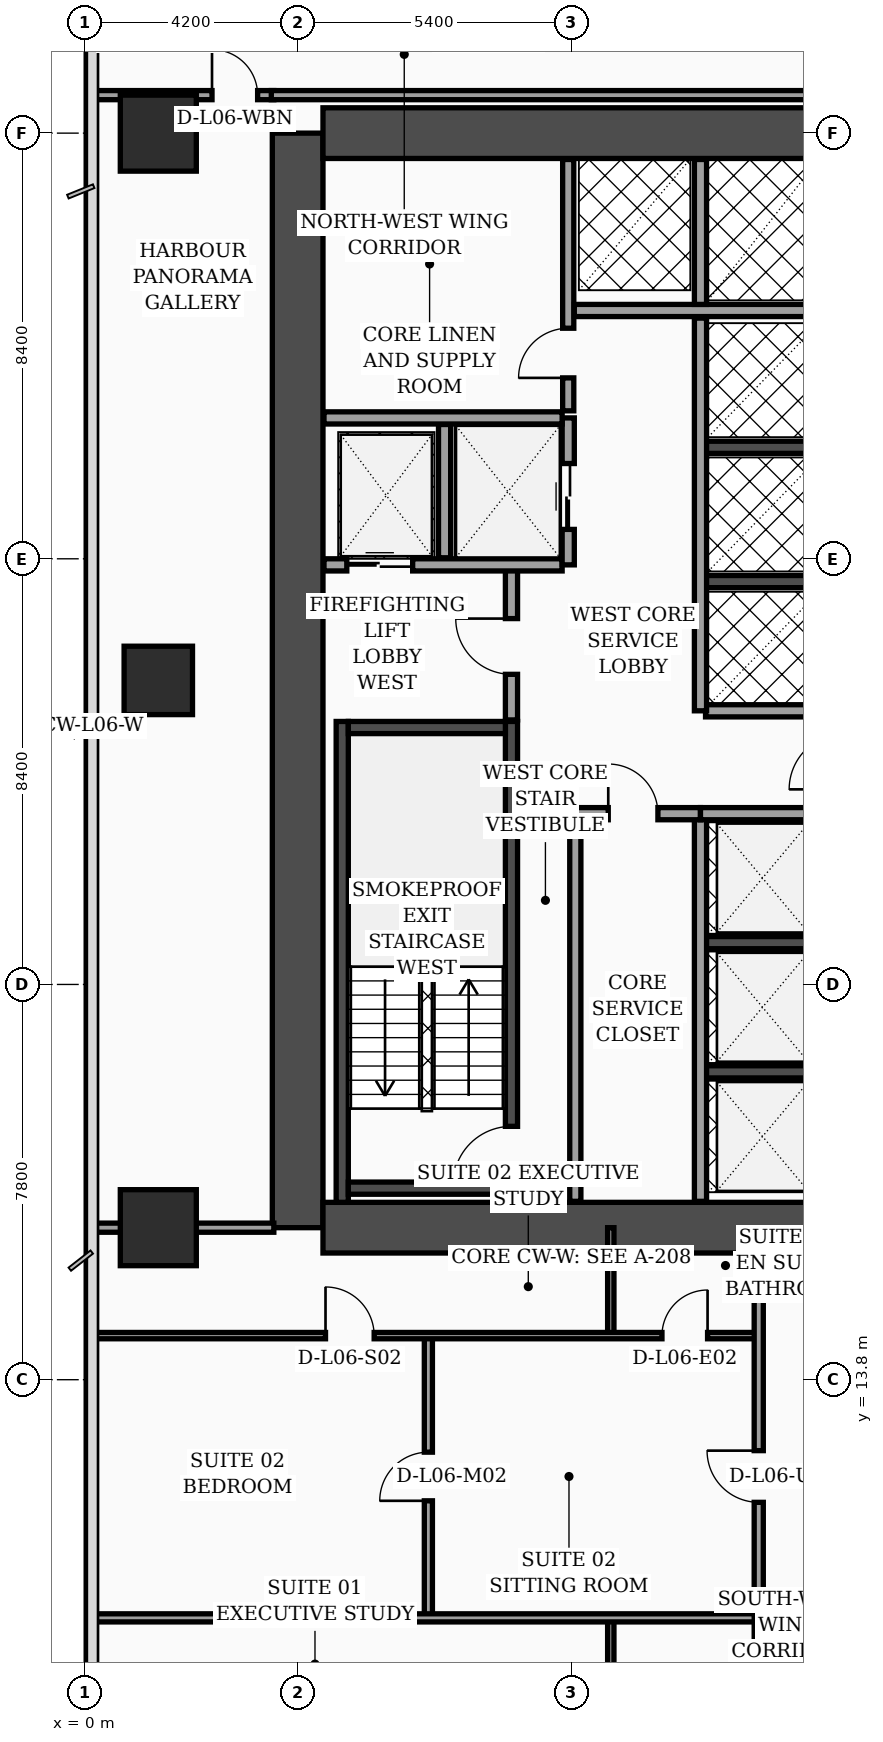
"""IFC4 building model, lengths in metres.
Left out: names, types, materials, properties, quantities, classifications, styles, units other than length and angle.
Written with IfcOpenShell. Run it as: python <this file> out.ifc"""

import sys

from ifc_helpers import new_model, si_unit, direction, frame, frame_2d, origin, origin_2d, place, context, subcontext, project, spatial, rectangle, extrude, element, fill, save


model = new_model("IFC4")
c1 = context("Model", 3, precision=1e-05, world=origin(), true_north=direction((0.0, 1.0)))
c2 = subcontext(c1, "Body", "Model", "MODEL_VIEW")
j1 = project(units=[si_unit("LENGTHUNIT", "METRE"), si_unit("PLANEANGLEUNIT", "RADIAN")], contexts=[c1])
p1 = place(None, origin())
s1 = spatial("IfcSite", under=j1, at=p1, CompositionType="ELEMENT")
p2 = place(p1, origin())
s2 = spatial("IfcBuilding", under=s1, at=p2, CompositionType="ELEMENT")
p3 = place(p2, frame((0.0, 0.0, 30.8)))
s3 = spatial("IfcBuildingStorey", under=s2, at=p3, CompositionType="ELEMENT", Elevation=30.8)
p4 = place(p3, frame((4.2, 16.8, 0.0), z_axis=(0.0, 0.0, 1.0), x_axis=(0.0, 1.0, 0.0)))
e1 = element("IfcWall", 1, at=p4, inside=s3, PredefinedType="SHEAR", context=c2, shape_type="SweptSolid", body=[
    extrude(rectangle(XDim=21.6, YDim=1.0, at=frame_2d((10.8, 0.0))), origin(), (0.0, 0.0, 1.0), 3.56),
])
for number, where, z_axis, x_axis in (
    (2, (4.7, 38.4, 0.0), (0.0, 0.0, 1.0), (1.0, 0.0, 0.0)),
    (3, (4.7, 16.8, 0.0), (0.0, 0.0, 1.0), (1.0, 0.0, 0.0)),
):
    element("IfcWall", number, at=place(p3, frame(where, z_axis=z_axis, x_axis=x_axis)), inside=s3, PredefinedType="SHEAR", context=c2, shape_type="SweptSolid", body=[
        extrude(rectangle(XDim=9.8, YDim=1.0, at=frame_2d((4.9, 0.0))), origin(), (0.0, 0.0, 1.0), 3.56),
    ])
p5 = place(p3, frame((5.08, 17.3, 0.0), z_axis=(0.0, 0.0, 1.0), x_axis=(0.0, 1.0, 0.0)))
e4 = element("IfcWall", 4, at=p5, inside=s3, PredefinedType="SOLIDWALL", context=c2, shape_type="SweptSolid", body=[
    extrude(rectangle(XDim=9.49, YDim=0.24, at=frame_2d((4.745, 0.0))), origin(), (0.0, 0.0, 1.0), 3.56),
])
p6 = place(p3, frame((8.42, 17.3, 0.0), z_axis=(0.0, 0.0, 1.0), x_axis=(0.0, 1.0, 0.0)))
e5 = element("IfcWall", 5, at=p6, inside=s3, PredefinedType="SOLIDWALL", context=c2, shape_type="SweptSolid", body=[
    extrude(rectangle(XDim=9.49, YDim=0.24, at=frame_2d((4.745, 0.0))), origin(), (0.0, 0.0, 1.0), 3.56),
])
p7 = place(p6, frame((0.35, 0.0, 0.0)))
e6 = element("IfcOpeningElement", 6, at=p7, cuts=e5, PredefinedType="OPENING", context=c2, shape_type="SweptSolid", body=[
    extrude(rectangle(XDim=1.15, YDim=2.2, at=frame_2d((0.575, 1.1))), frame((0.0, 0.13, 0.0), z_axis=(0.0, -1.0, 0.0), x_axis=(1.0, 0.0, 0.0)), (0.0, 0.0, 1.0), 0.26),
])
for number, where, z_axis, x_axis in (
    (7, (5.2, 17.58, 0.0), (0.0, 0.0, 1.0), (1.0, 0.0, 0.0)),
    (8, (5.2, 26.67, 0.0), (0.0, 0.0, 1.0), (1.0, 0.0, 0.0)),
):
    element("IfcWall", number, at=place(p3, frame(where, z_axis=z_axis, x_axis=x_axis)), inside=s3, PredefinedType="SOLIDWALL", context=c2, shape_type="SweptSolid", body=[
        extrude(rectangle(XDim=3.1, YDim=0.24, at=frame_2d((1.55, 0.0))), origin(), (0.0, 0.0, 1.0), 3.56),
    ])
for number, where, z_axis, x_axis in (
    (9, (12.18, 19.875, 0.0), (0.0, 0.0, 1.0), (1.0, 0.0, 0.0)),
    (10, (12.18, 22.425, 0.0), (0.0, 0.0, 1.0), (1.0, 0.0, 0.0)),
    (11, (12.18, 29.55, 0.0), (0.0, 0.0, 1.0), (1.0, 0.0, 0.0)),
    (12, (12.18, 32.2, 0.0), (0.0, 0.0, 1.0), (1.0, 0.0, 0.0)),
):
    element("IfcWall", number, at=place(p3, frame(where, z_axis=z_axis, x_axis=x_axis)), inside=s3, PredefinedType="SOLIDWALL", context=c2, shape_type="SweptSolid", body=[
        extrude(rectangle(XDim=2.32, YDim=0.24, at=frame_2d((1.16, 0.0))), origin(), (0.0, 0.0, 1.0), 3.56),
    ])
p8 = place(p3, frame((1.45, 16.8, 0.0), z_axis=(0.0, 0.0, 1.0), x_axis=(1.0, 0.0, 0.0)))
e13 = element("IfcColumn", 13, at=p8, inside=s3, PredefinedType="COLUMN", context=c2, shape_type="SweptSolid", body=[
    extrude(rectangle(XDim=1.5, YDim=1.5, at=origin_2d()), origin(), (0.0, 0.0, 1.0), 3.56),
])
p9 = place(p3, frame((1.45, 27.6, 0.0), z_axis=(0.0, 0.0, 1.0), x_axis=(1.0, 0.0, 0.0)))
e14 = element("IfcColumn", 14, at=p9, inside=s3, PredefinedType="COLUMN", context=c2, shape_type="SweptSolid", body=[
    extrude(rectangle(XDim=1.35, YDim=1.35, at=origin_2d()), origin(), (0.0, 0.0, 1.0), 3.56),
])
p10 = place(p3, frame((1.45, 38.4, 0.0), z_axis=(0.0, 0.0, 1.0), x_axis=(1.0, 0.0, 0.0)))
e15 = element("IfcColumn", 15, at=p10, inside=s3, PredefinedType="COLUMN", context=c2, shape_type="SweptSolid", body=[
    extrude(rectangle(XDim=1.5, YDim=1.5, at=origin_2d()), origin(), (0.0, 0.0, 1.0), 3.56),
])
p11 = place(p3, frame((8.42, 26.82, 0.0), z_axis=(0.0, 0.0, 1.0), x_axis=(0.0, 1.0, 0.0)))
e16 = element("IfcWall", 16, at=p11, inside=s3, PredefinedType="SOLIDWALL", context=c2, shape_type="SweptSolid", body=[
    extrude(rectangle(XDim=3.0, YDim=0.24, at=frame_2d((1.5, 0.0))), origin(), (0.0, 0.0, 1.0), 3.56),
])
p12 = place(p11, frame((0.9, 0.0, 0.0)))
e17 = element("IfcOpeningElement", 17, at=p12, cuts=e16, PredefinedType="OPENING", context=c2, shape_type="SweptSolid", body=[
    extrude(rectangle(XDim=1.1, YDim=2.2, at=frame_2d((0.55, 1.1))), frame((0.0, 0.13, 0.0), z_axis=(0.0, -1.0, 0.0), x_axis=(1.0, 0.0, 0.0)), (0.0, 0.0, 1.0), 0.26),
])
p13 = place(p3, frame((4.72, 29.88, 0.0), z_axis=(0.0, 0.0, 1.0), x_axis=(1.0, 0.0, 0.0)))
e18 = element("IfcWall", 18, at=p13, inside=s3, PredefinedType="SOLIDWALL", context=c2, shape_type="SweptSolid", body=[
    extrude(rectangle(XDim=4.7, YDim=0.24, at=frame_2d((2.35, 0.0))), origin(), (0.0, 0.0, 1.0), 3.56),
])
p14 = place(p13, frame((0.45, 0.0, 0.0)))
e19 = element("IfcOpeningElement", 19, at=p14, cuts=e18, PredefinedType="OPENING", context=c2, shape_type="SweptSolid", body=[
    extrude(rectangle(XDim=1.3, YDim=2.35, at=frame_2d((0.65, 1.175))), frame((0.0, 0.13, 0.0), z_axis=(0.0, -1.0, 0.0), x_axis=(1.0, 0.0, 0.0)), (0.0, 0.0, 1.0), 0.26),
])
p15 = place(p3, frame((7.1, 30.02, 0.0), z_axis=(0.0, 0.0, 1.0), x_axis=(0.0, 1.0, 0.0)))
e20 = element("IfcWall", 20, at=p15, inside=s3, PredefinedType="SOLIDWALL", context=c2, shape_type="SweptSolid", body=[
    extrude(rectangle(XDim=2.63, YDim=0.24, at=frame_2d((1.315, 0.0))), origin(), (0.0, 0.0, 1.0), 3.56),
])
p16 = place(p3, frame((9.54, 29.88, 0.0), z_axis=(0.0, 0.0, 1.0), x_axis=(0.0, 1.0, 0.0)))
e21 = element("IfcWall", 21, at=p16, inside=s3, PredefinedType="SOLIDWALL", context=c2, shape_type="SweptSolid", body=[
    extrude(rectangle(XDim=2.9, YDim=0.24, at=frame_2d((1.45, 0.0))), origin(), (0.0, 0.0, 1.0), 3.56),
])
p17 = place(p16, frame((0.7, 0.0, 0.0)))
e22 = element("IfcOpeningElement", 22, at=p17, cuts=e21, PredefinedType="OPENING", context=c2, shape_type="SweptSolid", body=[
    extrude(rectangle(XDim=1.3, YDim=2.35, at=frame_2d((0.65, 1.175))), frame((0.0, 0.13, 0.0), z_axis=(0.0, -1.0, 0.0), x_axis=(1.0, 0.0, 0.0)), (0.0, 0.0, 1.0), 0.26),
])
p18 = place(p3, frame((4.72, 32.78, 0.0), z_axis=(0.0, 0.0, 1.0), x_axis=(1.0, 0.0, 0.0)))
e23 = element("IfcWall", 23, at=p18, inside=s3, PredefinedType="SOLIDWALL", context=c2, shape_type="SweptSolid", body=[
    extrude(rectangle(XDim=4.7, YDim=0.24, at=frame_2d((2.35, 0.0))), origin(), (0.0, 0.0, 1.0), 3.56),
])
p19 = place(p3, frame((9.68, 17.32, 0.0), z_axis=(0.0, 0.0, 1.0), x_axis=(0.0, 1.0, 0.0)))
e24 = element("IfcWall", 24, at=p19, inside=s3, PredefinedType="SOLIDWALL", context=c2, shape_type="SweptSolid", body=[
    extrude(rectangle(XDim=7.68, YDim=0.22, at=frame_2d((3.84, 0.0))), origin(), (0.0, 0.0, 1.0), 3.56),
])
p20 = place(p3, frame((9.54, 32.92, 0.0), z_axis=(0.0, 0.0, 1.0), x_axis=(0.0, 1.0, 0.0)))
e25 = element("IfcWall", 25, at=p20, inside=s3, PredefinedType="SOLIDWALL", context=c2, shape_type="SweptSolid", body=[
    extrude(rectangle(XDim=4.96, YDim=0.22, at=frame_2d((2.48, 0.0))), origin(), (0.0, 0.0, 1.0), 3.56),
])
p21 = place(p20, frame((0.65, 0.0, 0.0)))
e26 = element("IfcOpeningElement", 26, at=p21, cuts=e25, PredefinedType="OPENING", context=c2, shape_type="SweptSolid", body=[
    extrude(rectangle(XDim=0.98, YDim=2.15, at=frame_2d((0.49, 1.075))), frame((0.0, 0.12, 0.0), z_axis=(0.0, -1.0, 0.0), x_axis=(1.0, 0.0, 0.0)), (0.0, 0.0, 1.0), 0.24),
])
p22 = place(p3, frame((12.15, 17.32, 0.0), z_axis=(0.0, 0.0, 1.0), x_axis=(0.0, 1.0, 0.0)))
e27 = element("IfcWall", 27, at=p22, inside=s3, PredefinedType="SOLIDWALL", context=c2, shape_type="SweptSolid", body=[
    extrude(rectangle(XDim=7.65, YDim=0.24, at=frame_2d((3.825, 0.0))), origin(), (0.0, 0.0, 1.0), 3.56),
])
p23 = place(p3, frame((9.68, 24.97, 0.0), z_axis=(0.0, 0.0, 1.0), x_axis=(1.0, 0.0, 0.0)))
e28 = element("IfcWall", 28, at=p23, inside=s3, PredefinedType="SOLIDWALL", context=c2, shape_type="SweptSolid", body=[
    extrude(rectangle(XDim=2.47, YDim=0.24, at=frame_2d((1.235, 0.0))), origin(), (0.0, 0.0, 1.0), 3.56),
])
p24 = place(p23, frame((0.65, 0.0, 0.0)))
e29 = element("IfcOpeningElement", 29, at=p24, cuts=e28, PredefinedType="OPENING", context=c2, shape_type="SweptSolid", body=[
    extrude(rectangle(XDim=0.98, YDim=2.15, at=frame_2d((0.49, 1.075))), frame((0.0, 0.13, 0.0), z_axis=(0.0, -1.0, 0.0), x_axis=(1.0, 0.0, 0.0)), (0.0, 0.0, 1.0), 0.26),
])
p25 = place(p3, frame((12.15, 24.97, 0.0), z_axis=(0.0, 0.0, 1.0), x_axis=(1.0, 0.0, 0.0)))
e30 = element("IfcWall", 30, at=p25, inside=s3, PredefinedType="SOLIDWALL", context=c2, shape_type="SweptSolid", body=[
    extrude(rectangle(XDim=2.33, YDim=0.24, at=frame_2d((1.165, 0.0))), origin(), (0.0, 0.0, 1.0), 2.84),
])
p26 = place(p3, frame((12.25, 27.0, 0.0), z_axis=(0.0, 0.0, 1.0), x_axis=(1.0, 0.0, 0.0)))
e31 = element("IfcWall", 31, at=p26, inside=s3, PredefinedType="SOLIDWALL", context=c2, shape_type="SweptSolid", body=[
    extrude(rectangle(XDim=2.23, YDim=0.24, at=frame_2d((1.115, 0.0))), origin(), (0.0, 0.0, 1.0), 3.56),
])
p27 = place(p3, frame((12.15, 27.0, 0.0), z_axis=(0.0, 0.0, 1.0), x_axis=(0.0, 1.0, 0.0)))
e32 = element("IfcWall", 32, at=p27, inside=s3, PredefinedType="SOLIDWALL", context=c2, shape_type="SweptSolid", body=[
    extrude(rectangle(XDim=7.75, YDim=0.24, at=frame_2d((3.875, 0.0))), origin(), (0.0, 0.0, 1.0), 3.56),
])
p28 = place(p3, frame((9.66, 34.9, 0.0), z_axis=(0.0, 0.0, 1.0), x_axis=(1.0, 0.0, 0.0)))
e33 = element("IfcWall", 33, at=p28, inside=s3, PredefinedType="SOLIDWALL", context=c2, shape_type="SweptSolid", body=[
    extrude(rectangle(XDim=4.82, YDim=0.24, at=frame_2d((2.41, 0.0))), origin(), (0.0, 0.0, 1.0), 3.56),
])
p29 = place(p3, frame((12.15, 35.02, 0.0), z_axis=(0.0, 0.0, 1.0), x_axis=(0.0, 1.0, 0.0)))
e34 = element("IfcWall", 34, at=p29, inside=s3, PredefinedType="SOLIDWALL", context=c2, shape_type="SweptSolid", body=[
    extrude(rectangle(XDim=2.86, YDim=0.24, at=frame_2d((1.43, 0.0))), origin(), (0.0, 0.0, 1.0), 3.56),
])
p30 = place(p3, frame((0.08, 16.8, 0.0), z_axis=(0.0, 0.0, 1.0), x_axis=(1.0, 0.0, 0.0)))
e35 = element("IfcWall", 35, at=p30, inside=s3, PredefinedType="PARTITIONING", context=c2, shape_type="SweptSolid", body=[
    extrude(rectangle(XDim=3.65, YDim=0.18, at=frame_2d((1.825, 0.0))), origin(), (0.0, 0.0, 1.0), 2.84),
])
p31 = place(p3, frame((0.08, 39.15, 0.0), z_axis=(0.0, 0.0, 1.0), x_axis=(1.0, 0.0, 0.0)))
e36 = element("IfcWall", 36, at=p31, inside=s3, PredefinedType="PARTITIONING", context=c2, shape_type="SweptSolid", body=[
    extrude(rectangle(XDim=3.65, YDim=0.18, at=frame_2d((1.825, 0.0))), origin(), (0.0, 0.0, 1.0), 2.84),
])
p32 = place(p31, frame((2.43, 0.0, 0.0)))
e37 = element("IfcOpeningElement", 37, at=p32, cuts=e36, PredefinedType="OPENING", context=c2, shape_type="SweptSolid", body=[
    extrude(rectangle(XDim=0.9, YDim=2.15, at=frame_2d((0.45, 1.075))), frame((0.0, 0.1, 0.0), z_axis=(0.0, -1.0, 0.0), x_axis=(1.0, 0.0, 0.0)), (0.0, 0.0, 1.0), 0.2),
])
p33 = place(p3, frame((10.38, 7.17, 0.0), z_axis=(0.0, 0.0, 1.0), x_axis=(0.0, 1.0, 0.0)))
e38 = element("IfcWall", 38, at=p33, inside=s3, PredefinedType="PARTITIONING", context=c2, shape_type="SweptSolid", body=[
    extrude(rectangle(XDim=1.93, YDim=0.125, at=frame_2d((0.965, 0.0))), origin(), (0.0, 0.0, 1.0), 3.09),
])
p34 = place(p3, frame((10.38, 14.67, 0.0), z_axis=(0.0, 0.0, 1.0), x_axis=(0.0, 1.0, 0.0)))
e39 = element("IfcWall", 39, at=p34, inside=s3, PredefinedType="PARTITIONING", context=c2, shape_type="SweptSolid", body=[
    extrude(rectangle(XDim=2.13, YDim=0.125, at=frame_2d((1.065, 0.0))), origin(), (0.0, 0.0, 1.0), 3.56),
])
p35 = place(p3, frame((6.78, 9.1, 0.0), z_axis=(0.0, 0.0, 1.0), x_axis=(0.0, 1.0, 0.0)))
e40 = element("IfcWall", 40, at=p35, inside=s3, PredefinedType="PARTITIONING", context=c2, shape_type="SweptSolid", body=[
    extrude(rectangle(XDim=5.57, YDim=0.16, at=frame_2d((2.785, 0.0))), origin(), (0.0, 0.0, 1.0), 3.14),
])
p36 = place(p35, frame((2.31, 0.0, 0.0)))
e41 = element("IfcOpeningElement", 41, at=p36, cuts=e40, PredefinedType="OPENING", context=c2, shape_type="SweptSolid", body=[
    extrude(rectangle(XDim=0.96, YDim=2.2, at=frame_2d((0.48, 1.1))), frame((0.0, 0.09, 0.0), z_axis=(0.0, -1.0, 0.0), x_axis=(1.0, 0.0, 0.0)), (0.0, 0.0, 1.0), 0.18),
])
p37 = place(p3, frame((0.08, 14.67, 0.0), z_axis=(0.0, 0.0, 1.0), x_axis=(1.0, 0.0, 0.0)))
e42 = element("IfcWall", 42, at=p37, inside=s3, PredefinedType="PARTITIONING", context=c2, shape_type="SweptSolid", body=[
    extrude(rectangle(XDim=13.22, YDim=0.125, at=frame_2d((6.61, 0.0))), origin(), (0.0, 0.0, 1.0), 2.84),
])
p38 = place(p37, frame((4.67, 0.0, 0.0)))
e43 = element("IfcOpeningElement", 43, at=p38, cuts=e42, PredefinedType="OPENING", context=c2, shape_type="SweptSolid", body=[
    extrude(rectangle(XDim=0.96, YDim=2.2, at=frame_2d((0.48, 1.1))), frame((0.0, 0.073, 0.0), z_axis=(0.0, -1.0, 0.0), x_axis=(1.0, 0.0, 0.0)), (0.0, 0.0, 1.0), 0.145),
])
p39 = place(p37, frame((11.31, 0.0, 0.0)))
e44 = element("IfcOpeningElement", 44, at=p39, cuts=e42, PredefinedType="OPENING", context=c2, shape_type="SweptSolid", body=[
    extrude(rectangle(XDim=0.9, YDim=2.15, at=frame_2d((0.45, 1.075))), frame((0.0, 0.073, 0.0), z_axis=(0.0, -1.0, 0.0), x_axis=(1.0, 0.0, 0.0)), (0.0, 0.0, 1.0), 0.145),
])
p40 = place(p3, frame((0.08, 9.1, 0.0), z_axis=(0.0, 0.0, 1.0), x_axis=(1.0, 0.0, 0.0)))
e45 = element("IfcWall", 45, at=p40, inside=s3, PredefinedType="PARTITIONING", context=c2, shape_type="SweptSolid", body=[
    extrude(rectangle(XDim=13.22, YDim=0.16, at=frame_2d((6.61, 0.0))), origin(), (0.0, 0.0, 1.0), 2.84),
])
p41 = place(p3, frame((13.3, 2.44, 0.0), z_axis=(0.0, 0.0, 1.0), x_axis=(0.0, 1.0, 0.0)))
e46 = element("IfcWall", 46, at=p41, inside=s3, PredefinedType="PARTITIONING", context=c2, shape_type="SweptSolid", body=[
    extrude(rectangle(XDim=14.36, YDim=0.18, at=frame_2d((7.18, 0.0))), origin(), (0.0, 0.0, 1.0), 3.04),
])
p42 = place(p41, frame((3.01, 0.0, 0.0)))
e47 = element("IfcOpeningElement", 47, at=p42, cuts=e46, PredefinedType="OPENING", context=c2, shape_type="SweptSolid", body=[
    extrude(rectangle(XDim=1.02, YDim=2.2, at=frame_2d((0.51, 1.1))), frame((0.0, 0.1, 0.0), z_axis=(0.0, -1.0, 0.0), x_axis=(1.0, 0.0, 0.0)), (0.0, 0.0, 1.0), 0.2),
])
p43 = place(p41, frame((8.94, 0.0, 0.0)))
e48 = element("IfcOpeningElement", 48, at=p43, cuts=e46, PredefinedType="OPENING", context=c2, shape_type="SweptSolid", body=[
    extrude(rectangle(XDim=1.02, YDim=2.2, at=frame_2d((0.51, 1.1))), frame((0.0, 0.1, 0.0), z_axis=(0.0, -1.0, 0.0), x_axis=(1.0, 0.0, 0.0)), (0.0, 0.0, 1.0), 0.2),
])
p44 = place(p3, frame((3.68, 39.15, 0.0), z_axis=(0.0, 0.0, 1.0), x_axis=(1.0, 0.0, 0.0)))
e49 = element("IfcWall", 49, at=p44, inside=s3, PredefinedType="PARTITIONING", context=c2, shape_type="SweptSolid", body=[
    extrude(rectangle(XDim=11.47, YDim=0.18, at=frame_2d((5.735, 0.0))), origin(), (0.0, 0.0, 1.0), 2.84),
])
p45 = place(p12, origin())
e50 = element("IfcDoor", 50, at=p45, inside=s3, OperationType="SINGLE_SWING_RIGHT", PredefinedType="DOOR", context=c2, shape_type="SweptSolid", body=[
    extrude(rectangle(XDim=1.1, YDim=2.2, at=frame_2d((0.55, 1.1))), frame((0.0, 0.025, 0.0), z_axis=(0.0, -1.0, 0.0), x_axis=(1.0, 0.0, 0.0)), (0.0, 0.0, 1.0), 0.05),
])
fill(e17, e50)
p46 = place(p14, origin())
e51 = element("IfcDoor", 51, at=p46, inside=s3, OperationType="DOUBLE_DOOR_SLIDING", PredefinedType="DOOR", context=c2, shape_type="SweptSolid", body=[
    extrude(rectangle(XDim=1.3, YDim=2.35, at=frame_2d((0.65, 1.175))), frame((0.0, 0.025, 0.0), z_axis=(0.0, -1.0, 0.0), x_axis=(1.0, 0.0, 0.0)), (0.0, 0.0, 1.0), 0.05),
])
fill(e19, e51)
p47 = place(p17, origin())
e52 = element("IfcDoor", 52, at=p47, inside=s3, OperationType="DOUBLE_DOOR_SLIDING", PredefinedType="DOOR", context=c2, shape_type="SweptSolid", body=[
    extrude(rectangle(XDim=1.3, YDim=2.35, at=frame_2d((0.65, 1.175))), frame((0.0, 0.025, 0.0), z_axis=(0.0, -1.0, 0.0), x_axis=(1.0, 0.0, 0.0)), (0.0, 0.0, 1.0), 0.05),
])
fill(e22, e52)
p48 = place(p21, origin())
e53 = element("IfcDoor", 53, at=p48, inside=s3, OperationType="SINGLE_SWING_LEFT", PredefinedType="DOOR", context=c2, shape_type="SweptSolid", body=[
    extrude(rectangle(XDim=0.98, YDim=2.15, at=frame_2d((0.49, 1.075))), frame((0.0, 0.025, 0.0), z_axis=(0.0, -1.0, 0.0), x_axis=(1.0, 0.0, 0.0)), (0.0, 0.0, 1.0), 0.05),
])
fill(e26, e53)
p49 = place(p24, origin())
e54 = element("IfcDoor", 54, at=p49, inside=s3, OperationType="SINGLE_SWING_LEFT", PredefinedType="DOOR", context=c2, shape_type="SweptSolid", body=[
    extrude(rectangle(XDim=0.98, YDim=2.15, at=frame_2d((0.49, 1.075))), frame((0.0, 0.025, 0.0), z_axis=(0.0, -1.0, 0.0), x_axis=(1.0, 0.0, 0.0)), (0.0, 0.0, 1.0), 0.05),
])
fill(e29, e54)
p50 = place(p32, origin())
e55 = element("IfcDoor", 55, at=p50, inside=s3, OperationType="SINGLE_SWING_LEFT", PredefinedType="DOOR", context=c2, shape_type="SweptSolid", body=[
    extrude(rectangle(XDim=0.9, YDim=2.15, at=frame_2d((0.45, 1.075))), frame((0.0, 0.025, 0.0), z_axis=(0.0, -1.0, 0.0), x_axis=(1.0, 0.0, 0.0)), (0.0, 0.0, 1.0), 0.05),
])
fill(e37, e55)
p51 = place(p36, origin())
e56 = element("IfcDoor", 56, at=p51, inside=s3, OperationType="SINGLE_SWING_LEFT", PredefinedType="DOOR", context=c2, shape_type="SweptSolid", body=[
    extrude(rectangle(XDim=0.96, YDim=2.2, at=frame_2d((0.48, 1.1))), frame((0.0, 0.025, 0.0), z_axis=(0.0, -1.0, 0.0), x_axis=(1.0, 0.0, 0.0)), (0.0, 0.0, 1.0), 0.05),
])
fill(e41, e56)
p52 = place(p38, origin())
e57 = element("IfcDoor", 57, at=p52, inside=s3, OperationType="SINGLE_SWING_LEFT", PredefinedType="DOOR", context=c2, shape_type="SweptSolid", body=[
    extrude(rectangle(XDim=0.96, YDim=2.2, at=frame_2d((0.48, 1.1))), frame((0.0, 0.025, 0.0), z_axis=(0.0, -1.0, 0.0), x_axis=(1.0, 0.0, 0.0)), (0.0, 0.0, 1.0), 0.05),
])
fill(e43, e57)
p53 = place(p39, origin())
e58 = element("IfcDoor", 58, at=p53, inside=s3, OperationType="SINGLE_SWING_RIGHT", PredefinedType="DOOR", context=c2, shape_type="SweptSolid", body=[
    extrude(rectangle(XDim=0.9, YDim=2.15, at=frame_2d((0.45, 1.075))), frame((0.0, 0.025, 0.0), z_axis=(0.0, -1.0, 0.0), x_axis=(1.0, 0.0, 0.0)), (0.0, 0.0, 1.0), 0.05),
])
fill(e44, e58)
p54 = place(p43, origin())
e59 = element("IfcDoor", 59, at=p54, inside=s3, OperationType="SINGLE_SWING_RIGHT", PredefinedType="DOOR", context=c2, shape_type="SweptSolid", body=[
    extrude(rectangle(XDim=1.02, YDim=2.2, at=frame_2d((0.51, 1.1))), frame((0.0, 0.025, 0.0), z_axis=(0.0, -1.0, 0.0), x_axis=(1.0, 0.0, 0.0)), (0.0, 0.0, 1.0), 0.05),
])
fill(e48, e59)
p55 = place(p7, origin())
e60 = element("IfcDoor", 60, at=p55, inside=s3, OperationType="SINGLE_SWING_LEFT", PredefinedType="DOOR", context=c2, shape_type="SweptSolid", body=[
    extrude(rectangle(XDim=1.15, YDim=2.2, at=frame_2d((0.575, 1.1))), frame((0.0, 0.025, 0.0), z_axis=(0.0, -1.0, 0.0), x_axis=(1.0, 0.0, 0.0)), (0.0, 0.0, 1.0), 0.05),
])
fill(e6, e60)
save(model, sys.argv[1])
